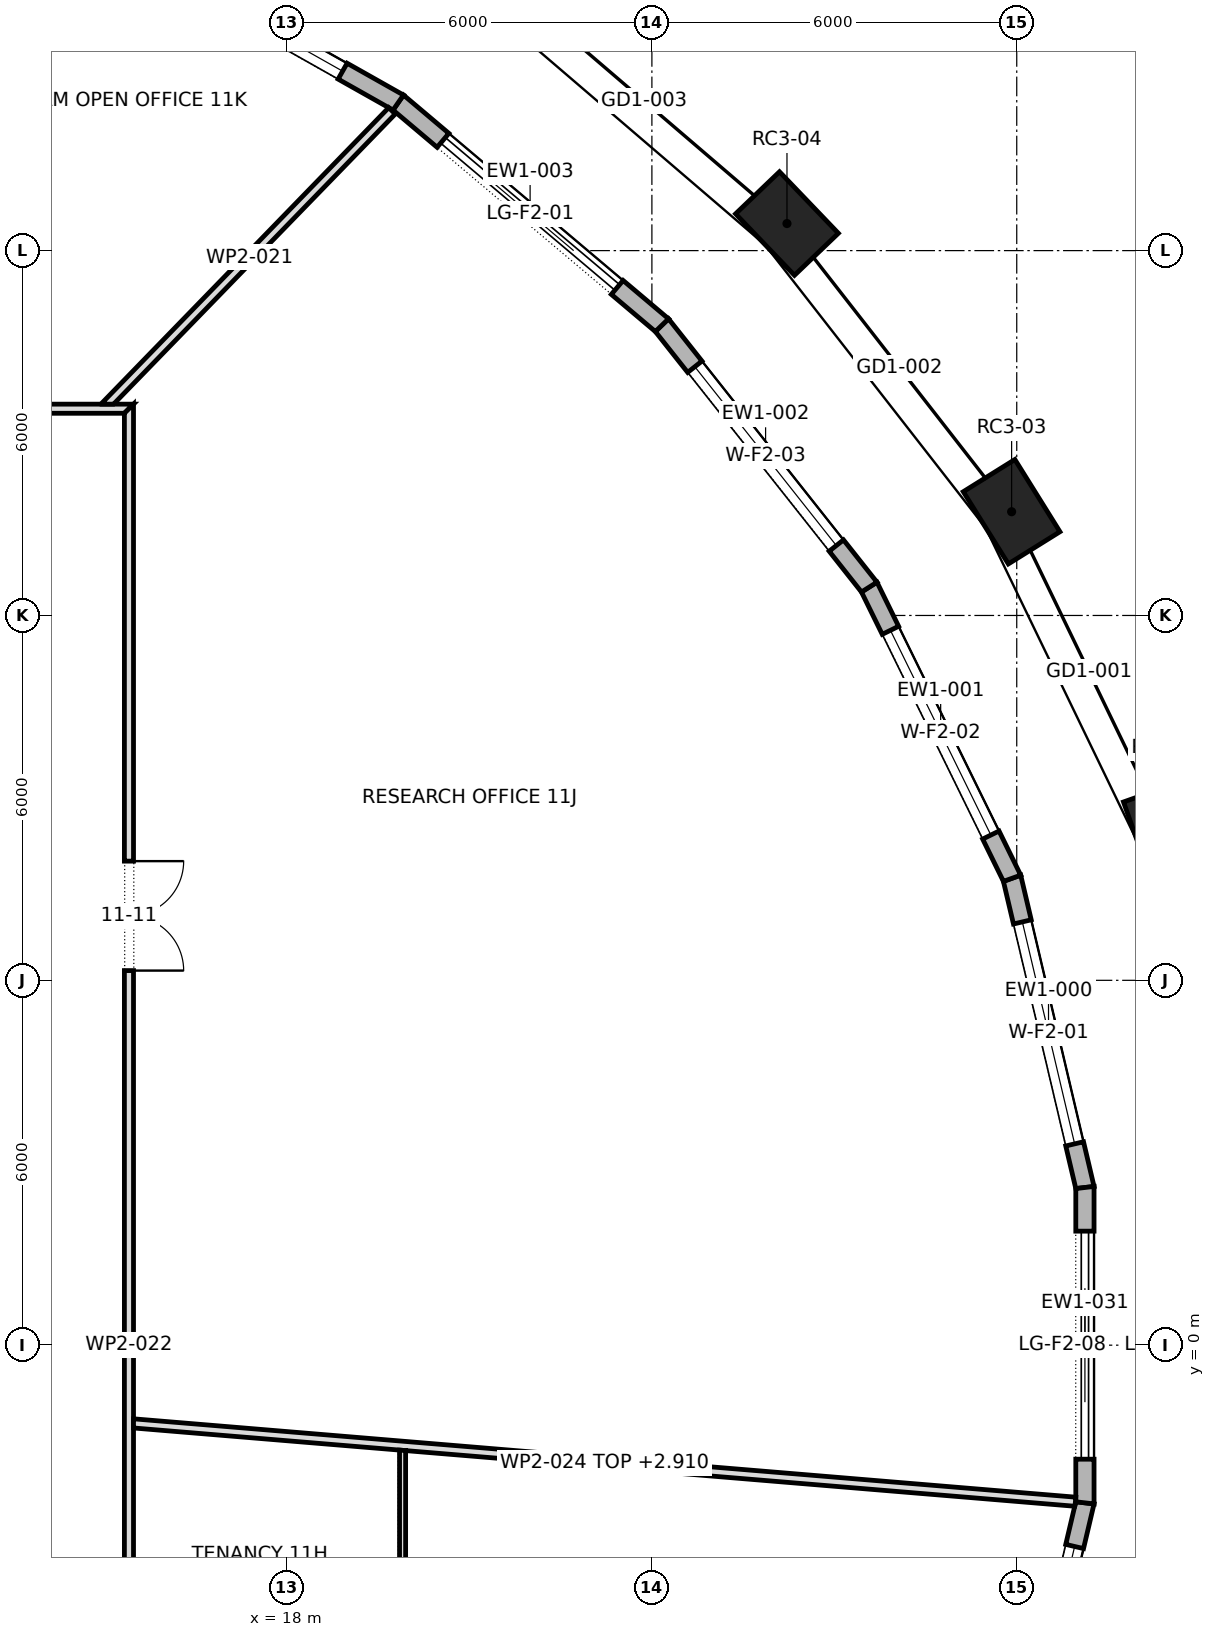
"""IFC4 building model, lengths in metres.
Left out: names, types, materials, properties, quantities, classifications, styles, units other than length and angle.
Written with IfcOpenShell. Run it as: python <this file> out.ifc"""

import sys

from ifc_helpers import new_model, si_unit, direction, frame, frame_2d, origin, origin_2d, place, context, subcontext, project, spatial, polyline, rectangle, outline, extrude, element, fill, save


model = new_model("IFC4")
c1 = context("Model", 3, precision=1e-05, world=origin(), true_north=direction((0.0, 1.0)))
c2 = subcontext(c1, "Body", "Model", "MODEL_VIEW")
j1 = project(units=[si_unit("LENGTHUNIT", "METRE"), si_unit("PLANEANGLEUNIT", "RADIAN")], contexts=[c1])
p1 = place(None, origin())
s1 = spatial("IfcSite", under=j1, at=p1, CompositionType="ELEMENT")
p2 = place(p1, origin())
s2 = spatial("IfcBuilding", under=s1, at=p2, CompositionType="ELEMENT")
p3 = place(p2, frame((0.0, 0.0, 154.9)))
s3 = spatial("IfcBuildingStorey", under=s2, at=p3, CompositionType="ELEMENT", Elevation=154.9)
for number, where, z_axis, x_axis in (
    (1, (32.46, 8.44, 0.0), (0.0, 0.0, 1.0), (-0.334, 0.943, 0.0)),
    (2, (29.916, 13.706, 0.0), (0.0, 0.0, 1.0), (-0.529, 0.849, 0.0)),
    (3, (26.221, 18.445, 0.0), (0.0, 0.0, 1.0), (-0.692, 0.722, 0.0)),
):
    element("IfcColumn", number, at=place(p3, frame(where, z_axis=z_axis, x_axis=x_axis)), inside=s3, PredefinedType="COLUMN", context=c2, shape_type="SweptSolid", body=[
        extrude(rectangle(XDim=1.4, YDim=1.0, at=origin_2d()), origin(), (0.0, 0.0, 1.0), 4.2),
    ])
p4 = place(p3, frame((31.121, 2.593, 0.0), z_axis=(0.0, 0.0, 1.0), x_axis=(-0.229297175564, 0.973356463624, 0.0)))
e4 = element("IfcWall", 4, at=p4, inside=s3, PredefinedType="STANDARD", context=c2, shape_type="SweptSolid", body=[
    extrude(outline(polyline([(-0.017, -0.15), (5.241, -0.15), (5.208, 0.15), (0.017, 0.15), (-0.017, -0.15)])), origin(), (0.0, 0.0, 1.0), 3.9),
])
p5 = place(p4, frame((0.737, 0.0, 0.6)))
e5 = element("IfcOpeningElement", 5, at=p5, cuts=e4, PredefinedType="OPENING", context=c2, shape_type="SweptSolid", body=[
    extrude(rectangle(XDim=3.75, YDim=2.85, at=frame_2d((1.875, 1.425))), frame((0.0, 0.162, 0.0), z_axis=(0.0, -1.0, 0.0), x_axis=(1.0, 0.0, 0.0)), (0.0, 0.0, 1.0), 0.324),
])
p6 = place(p3, frame((29.923, 7.678, 0.0), z_axis=(0.0, 0.0, 1.0), x_axis=(-0.440444485575, 0.897779847806, 0.0)))
e6 = element("IfcWall", 6, at=p6, inside=s3, PredefinedType="STANDARD", context=c2, shape_type="SweptSolid", body=[
    extrude(outline(polyline([(-0.017, -0.15), (5.35, -0.15), (5.317, 0.15), (0.017, 0.15), (-0.017, -0.15)])), origin(), (0.0, 0.0, 1.0), 3.9),
])
p7 = place(p6, frame((0.792, 0.0, 0.6)))
e7 = element("IfcOpeningElement", 7, at=p7, cuts=e6, PredefinedType="OPENING", context=c2, shape_type="SweptSolid", body=[
    extrude(rectangle(XDim=3.75, YDim=2.85, at=frame_2d((1.875, 1.425))), frame((0.0, 0.162, 0.0), z_axis=(0.0, -1.0, 0.0), x_axis=(1.0, 0.0, 0.0)), (0.0, 0.0, 1.0), 0.324),
])
p8 = place(p3, frame((27.574, 12.467, 0.0), z_axis=(0.0, 0.0, 1.0), x_axis=(-0.620577705153, 0.784144955902, 0.0)))
e8 = element("IfcWall", 8, at=p8, inside=s3, PredefinedType="STANDARD", context=c2, shape_type="SweptSolid", body=[
    extrude(outline(polyline([(-0.016, -0.15), (5.508, -0.15), (5.478, 0.15), (0.016, 0.15), (-0.016, -0.15)])), origin(), (0.0, 0.0, 1.0), 3.9),
])
p9 = place(p8, frame((0.871, 0.0, 0.6)))
e9 = element("IfcOpeningElement", 9, at=p9, cuts=e8, PredefinedType="OPENING", context=c2, shape_type="SweptSolid", body=[
    extrude(rectangle(XDim=3.75, YDim=2.85, at=frame_2d((1.875, 1.425))), frame((0.0, 0.162, 0.0), z_axis=(0.0, -1.0, 0.0), x_axis=(1.0, 0.0, 0.0)), (0.0, 0.0, 1.0), 0.324),
])
p10 = place(p3, frame((24.165, 16.774, 0.0), z_axis=(0.0, 0.0, 1.0), x_axis=(-0.764076096085, 0.645126126732, 0.0)))
e10 = element("IfcWall", 10, at=p10, inside=s3, PredefinedType="STANDARD", context=c2, shape_type="SweptSolid", body=[
    extrude(outline(polyline([(-0.015, -0.15), (5.689, -0.15), (5.661, 0.15), (0.015, 0.15), (-0.015, -0.15)])), origin(), (0.0, 0.0, 1.0), 3.9),
])
p11 = place(p10, frame((0.962, 0.0, 0.0)))
e11 = element("IfcOpeningElement", 11, at=p11, cuts=e10, PredefinedType="OPENING", context=c2, shape_type="SweptSolid", body=[
    extrude(rectangle(XDim=3.75, YDim=3.45, at=frame_2d((1.875, 1.725))), frame((0.0, 0.162, 0.0), z_axis=(0.0, -1.0, 0.0), x_axis=(1.0, 0.0, 0.0)), (0.0, 0.0, 1.0), 0.324),
])
p12 = place(p3, frame((19.829, 20.435, 0.0), z_axis=(0.0, 0.0, 1.0), x_axis=(-0.870982130072, 0.491314694565, 0.0)))
e12 = element("IfcWall", 12, at=p12, inside=s3, PredefinedType="STANDARD", context=c2, shape_type="SweptSolid", body=[
    extrude(outline(polyline([(-0.014, -0.15), (5.865, -0.15), (5.838, 0.15), (0.014, 0.15), (-0.014, -0.15)])), origin(), (0.0, 0.0, 1.0), 3.9),
])
p13 = place(p12, frame((1.051, 0.0, 0.6)))
e13 = element("IfcOpeningElement", 13, at=p13, cuts=e12, PredefinedType="OPENING", context=c2, shape_type="SweptSolid", body=[
    extrude(rectangle(XDim=3.75, YDim=2.85, at=frame_2d((1.875, 1.425))), frame((0.0, 0.162, 0.0), z_axis=(0.0, -1.0, 0.0), x_axis=(1.0, 0.0, 0.0)), (0.0, 0.0, 1.0), 0.324),
])
p14 = place(p3, frame((29.923, -7.678, 0.0), z_axis=(0.0, 0.0, 1.0), x_axis=(0.229297175564, 0.973356463624, 0.0)))
e14 = element("IfcWall", 14, at=p14, inside=s3, PredefinedType="STANDARD", context=c2, shape_type="SweptSolid", body=[
    extrude(outline(polyline([(-0.017, -0.15), (5.242, -0.15), (5.207, 0.15), (0.017, 0.15), (-0.017, -0.15)])), origin(), (0.0, 0.0, 1.0), 3.9),
])
p15 = place(p14, frame((0.737, 0.0, 0.6)))
e15 = element("IfcOpeningElement", 15, at=p15, cuts=e14, PredefinedType="OPENING", context=c2, shape_type="SweptSolid", body=[
    extrude(rectangle(XDim=3.75, YDim=2.85, at=frame_2d((1.875, 1.425))), frame((0.0, 0.162, 0.0), z_axis=(0.0, -1.0, 0.0), x_axis=(1.0, 0.0, 0.0)), (0.0, 0.0, 1.0), 0.324),
])
p16 = place(p3, frame((31.121, -2.593, 0.0), z_axis=(0.0, 0.0, 1.0), x_axis=(0.0, 1.0, 0.0)))
e16 = element("IfcWall", 16, at=p16, inside=s3, PredefinedType="STANDARD", context=c2, shape_type="SweptSolid", body=[
    extrude(outline(polyline([(-0.017, -0.15), (5.203, -0.15), (5.168, 0.15), (0.017, 0.15), (-0.017, -0.15)])), origin(), (0.0, 0.0, 1.0), 3.9),
])
p17 = place(p16, frame((0.718, 0.0, 0.0)))
e17 = element("IfcOpeningElement", 17, at=p17, cuts=e16, PredefinedType="OPENING", context=c2, shape_type="SweptSolid", body=[
    extrude(rectangle(XDim=3.75, YDim=3.45, at=frame_2d((1.875, 1.725))), frame((0.0, 0.162, 0.0), z_axis=(0.0, -1.0, 0.0), x_axis=(1.0, 0.0, 0.0)), (0.0, 0.0, 1.0), 0.324),
])
p18 = place(p3, frame((5.53, 15.4, 0.0), z_axis=(0.0, 0.0, 1.0), x_axis=(1.0, 0.0, 0.0)))
e18 = element("IfcWall", 18, at=p18, inside=s3, PredefinedType="PARTITIONING", context=c2, shape_type="SweptSolid", body=[
    extrude(outline(polyline([(0.0, -0.075), (1.959, -0.075), (3.918, -0.075), (5.877, -0.075), (7.836, -0.075), (9.795, -0.075), (9.945, 0.075), (7.956, 0.075), (5.967, 0.075), (3.978, 0.075), (1.989, 0.075), (0.0, 0.075), (0.0, -0.075)])), origin(), (0.0, 0.0, 1.0), 3.9),
])
p19 = place(p18, frame((4.22, 0.0, 0.0)))
e19 = element("IfcOpeningElement", 19, at=p19, cuts=e18, PredefinedType="OPENING", context=c2, shape_type="SweptSolid", body=[
    extrude(rectangle(XDim=1.0, YDim=2.1, at=frame_2d((0.5, 1.05))), frame((0.0, 0.087, 0.0), z_axis=(0.0, -1.0, 0.0), x_axis=(1.0, 0.0, 0.0)), (0.0, 0.0, 1.0), 0.174),
])
p20 = place(p3, frame((14.992, 15.423, 0.0), z_axis=(0.0, 0.0, 1.0), x_axis=(0.696574400919, 0.71748456707, 0.0)))
e20 = element("IfcWall", 20, at=p20, inside=s3, PredefinedType="PARTITIONING", context=c2, shape_type="SweptSolid", body=[
    extrude(outline(polyline([(0.0, 0.075), (0.0, 0.074), (0.145, -0.075), (1.808, -0.075), (3.47, -0.075), (5.133, -0.075), (6.795, -0.075), (6.795, 0.075), (5.096, 0.075), (3.397, 0.075), (1.699, 0.075), (0.0, 0.075)])), origin(), (0.0, 0.0, 1.0), 3.9),
])
p21 = place(p3, frame((15.4, -15.475, 0.0), z_axis=(0.0, 0.0, 1.0), x_axis=(0.0, 1.0, 0.0)))
e21 = element("IfcWall", 21, at=p21, inside=s3, PredefinedType="PARTITIONING", context=c2, shape_type="SweptSolid", body=[
    extrude(outline(polyline([(0.0, -0.075), (1.935, -0.075), (3.869, -0.075), (5.803, -0.075), (7.738, -0.075), (9.672, -0.075), (11.606, -0.075), (13.541, -0.075), (15.475, -0.075), (17.409, -0.075), (19.344, -0.075), (21.278, -0.075), (23.212, -0.075), (25.147, -0.075), (27.081, -0.075), (29.016, -0.075), (30.95, -0.075), (30.8, 0.075), (28.885, 0.075), (26.969, 0.075), (25.053, 0.075), (23.138, 0.075), (21.222, 0.075), (19.306, 0.075), (17.391, 0.075), (15.475, 0.075), (13.56, 0.075), (11.644, 0.075), (9.728, 0.075), (7.812, 0.075), (5.897, 0.075), (3.981, 0.075), (2.066, 0.075), (0.15, 0.075), (0.0, -0.075)])), origin(), (0.0, 0.0, 1.0), 3.9),
])
p22 = place(p21, frame((9.0, 0.0, 0.0)))
e22 = element("IfcOpeningElement", 22, at=p22, cuts=e21, PredefinedType="OPENING", context=c2, shape_type="SweptSolid", body=[
    extrude(rectangle(XDim=1.0, YDim=2.1, at=frame_2d((0.5, 1.05))), frame((0.0, 0.087, 0.0), z_axis=(0.0, -1.0, 0.0), x_axis=(1.0, 0.0, 0.0)), (0.0, 0.0, 1.0), 0.174),
])
p23 = place(p21, frame((21.635, 0.0, 0.0)))
e23 = element("IfcOpeningElement", 23, at=p23, cuts=e21, PredefinedType="OPENING", context=c2, shape_type="SweptSolid", body=[
    extrude(rectangle(XDim=1.8, YDim=2.1, at=frame_2d((0.9, 1.05))), frame((0.0, 0.087, 0.0), z_axis=(0.0, -1.0, 0.0), x_axis=(1.0, 0.0, 0.0)), (0.0, 0.0, 1.0), 0.174),
])
p24 = place(p3, frame((15.469, -1.286, 0.0), z_axis=(0.0, 0.0, 1.0), x_axis=(0.996560145348, -0.082872653534, 0.0)))
e24 = element("IfcWall", 24, at=p24, inside=s3, PredefinedType="PARTITIONING", context=c2, shape_type="SweptSolid", body=[
    extrude(outline(polyline([(0.012, -0.075), (1.504, -0.075), (2.996, -0.075), (4.488, -0.075), (4.502, -0.074), (4.502, -0.075), (6.343, -0.075), (8.183, -0.075), (10.023, -0.075), (11.864, -0.075), (13.704, -0.075), (15.544, -0.075), (15.549, -0.045), (15.549, 0.075), (13.605, 0.075), (11.662, 0.075), (9.718, 0.075), (7.774, 0.075), (5.831, 0.075), (3.887, 0.075), (1.944, 0.075), (0.0, 0.075), (0.0, 0.07), (0.012, -0.075)])), origin(), (0.0, 0.0, 1.0), 2.91),
])
p25 = place(p3, frame((19.9, -1.726, 0.0), z_axis=(0.0, 0.0, 1.0), x_axis=(0.0, -1.0, 0.0)))
e25 = element("IfcWall", 25, at=p25, inside=s3, PredefinedType="PARTITIONING", context=c2, shape_type="SweptSolid", body=[
    extrude(outline(polyline([(0.0, -0.05), (1.99, -0.05), (3.979, -0.05), (5.969, -0.05), (7.959, -0.05), (9.948, -0.05), (11.938, -0.05), (12.007, 0.049), (12.007, 0.05), (10.007, 0.05), (8.007, 0.05), (6.007, 0.05), (4.008, 0.05), (2.008, 0.05), (0.008, 0.05), (0.0, -0.047), (0.0, -0.05)])), origin(), (0.0, 0.0, 1.0), 3.9),
])
p26 = place(p25, frame((5.544, 0.0, 0.0)))
e26 = element("IfcOpeningElement", 26, at=p26, cuts=e25, PredefinedType="OPENING", context=c2, shape_type="SweptSolid", body=[
    extrude(rectangle(XDim=0.9, YDim=2.1, at=frame_2d((0.45, 1.05))), frame((0.0, 0.062, 0.0), z_axis=(0.0, -1.0, 0.0), x_axis=(1.0, 0.0, 0.0)), (0.0, 0.0, 1.0), 0.124),
])
p27 = place(p5, origin())
e27 = element("IfcWindow", 27, at=p27, inside=s3, PartitioningType="TRIPLE_PANEL_VERTICAL", PredefinedType="WINDOW", context=c2, shape_type="SweptSolid", body=[
    extrude(rectangle(XDim=3.75, YDim=2.85, at=frame_2d((1.875, 1.425))), frame((0.0, 0.03, 0.0), z_axis=(0.0, -1.0, 0.0), x_axis=(1.0, 0.0, 0.0)), (0.0, 0.0, 1.0), 0.06),
])
fill(e5, e27)
p28 = place(p7, origin())
e28 = element("IfcWindow", 28, at=p28, inside=s3, PartitioningType="TRIPLE_PANEL_VERTICAL", PredefinedType="WINDOW", context=c2, shape_type="SweptSolid", body=[
    extrude(rectangle(XDim=3.75, YDim=2.85, at=frame_2d((1.875, 1.425))), frame((0.0, 0.03, 0.0), z_axis=(0.0, -1.0, 0.0), x_axis=(1.0, 0.0, 0.0)), (0.0, 0.0, 1.0), 0.06),
])
fill(e7, e28)
p29 = place(p9, origin())
e29 = element("IfcWindow", 29, at=p29, inside=s3, PartitioningType="TRIPLE_PANEL_VERTICAL", PredefinedType="WINDOW", context=c2, shape_type="SweptSolid", body=[
    extrude(rectangle(XDim=3.75, YDim=2.85, at=frame_2d((1.875, 1.425))), frame((0.0, 0.03, 0.0), z_axis=(0.0, -1.0, 0.0), x_axis=(1.0, 0.0, 0.0)), (0.0, 0.0, 1.0), 0.06),
])
fill(e9, e29)
p30 = place(p11, origin())
e30 = element("IfcDoor", 30, at=p30, inside=s3, OperationType="DOUBLE_DOOR_SLIDING", PredefinedType="DOOR", context=c2, shape_type="SweptSolid", body=[
    extrude(rectangle(XDim=3.75, YDim=3.45, at=frame_2d((1.875, 1.725))), frame((0.0, 0.025, 0.0), z_axis=(0.0, -1.0, 0.0), x_axis=(1.0, 0.0, 0.0)), (0.0, 0.0, 1.0), 0.05),
])
fill(e11, e30)
p31 = place(p13, origin())
e31 = element("IfcWindow", 31, at=p31, inside=s3, PartitioningType="TRIPLE_PANEL_VERTICAL", PredefinedType="WINDOW", context=c2, shape_type="SweptSolid", body=[
    extrude(rectangle(XDim=3.75, YDim=2.85, at=frame_2d((1.875, 1.425))), frame((0.0, 0.03, 0.0), z_axis=(0.0, -1.0, 0.0), x_axis=(1.0, 0.0, 0.0)), (0.0, 0.0, 1.0), 0.06),
])
fill(e13, e31)
p32 = place(p15, origin())
e32 = element("IfcWindow", 32, at=p32, inside=s3, PartitioningType="TRIPLE_PANEL_VERTICAL", PredefinedType="WINDOW", context=c2, shape_type="SweptSolid", body=[
    extrude(rectangle(XDim=3.75, YDim=2.85, at=frame_2d((1.875, 1.425))), frame((0.0, 0.03, 0.0), z_axis=(0.0, -1.0, 0.0), x_axis=(1.0, 0.0, 0.0)), (0.0, 0.0, 1.0), 0.06),
])
fill(e15, e32)
p33 = place(p17, origin())
e33 = element("IfcDoor", 33, at=p33, inside=s3, OperationType="DOUBLE_DOOR_SLIDING", PredefinedType="DOOR", context=c2, shape_type="SweptSolid", body=[
    extrude(rectangle(XDim=3.75, YDim=3.45, at=frame_2d((1.875, 1.725))), frame((0.0, 0.025, 0.0), z_axis=(0.0, -1.0, 0.0), x_axis=(1.0, 0.0, 0.0)), (0.0, 0.0, 1.0), 0.05),
])
fill(e17, e33)
p34 = place(p23, frame((1.8, 0.0, 0.0), z_axis=(0.0, 0.0, 1.0), x_axis=(-1.0, 0.0, 0.0)))
e34 = element("IfcDoor", 34, at=p34, inside=s3, OperationType="DOUBLE_DOOR_SINGLE_SWING", PredefinedType="DOOR", context=c2, shape_type="SweptSolid", body=[
    extrude(rectangle(XDim=1.8, YDim=2.1, at=frame_2d((0.9, 1.05))), frame((0.0, 0.025, 0.0), z_axis=(0.0, -1.0, 0.0), x_axis=(1.0, 0.0, 0.0)), (0.0, 0.0, 1.0), 0.05),
])
fill(e23, e34)
save(model, sys.argv[1])
